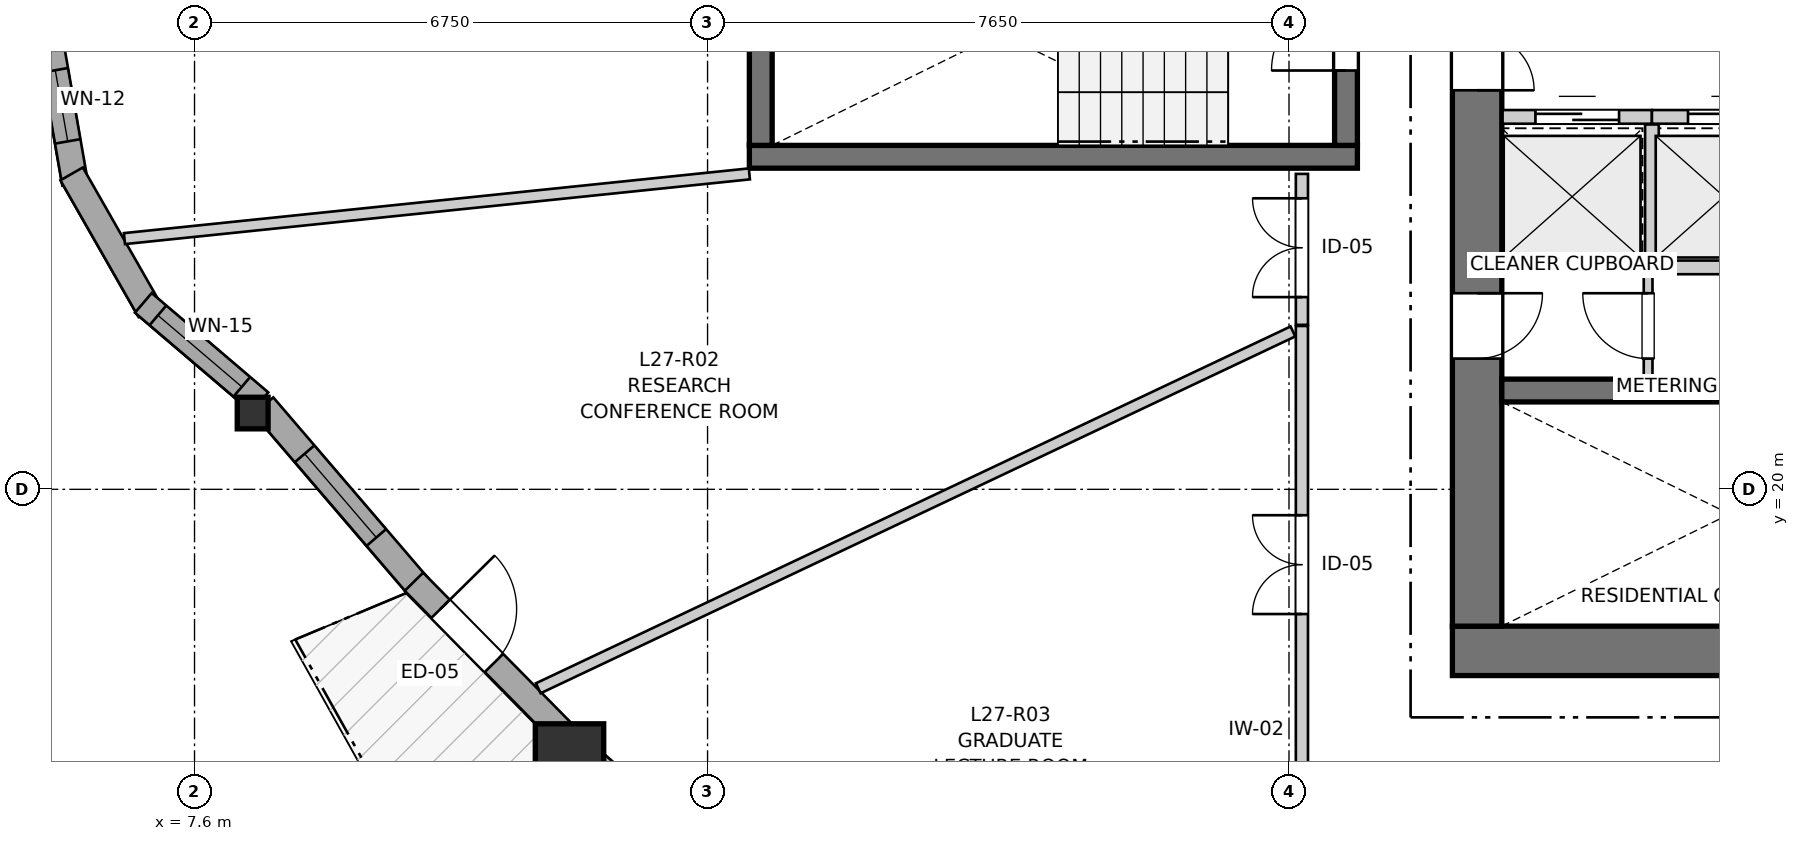
"""IFC4 building model, lengths in metres.
Left out: names, types, materials, properties, quantities, classifications, styles, units other than length and angle.
Written with IfcOpenShell. Run it as: python <this file> out.ifc"""

import sys

from ifc_helpers import new_model, si_unit, direction, frame, frame_2d, origin, origin_2d, place, context, subcontext, project, spatial, rectangle, i_section, extrude, source, transform, mapped, element, fill, save


model = new_model("IFC4")
c1 = context("Model", 3, precision=1e-05, world=origin(), true_north=direction((0.0, 1.0)))
c2 = subcontext(c1, "Body", "Model", "MODEL_VIEW")
j1 = project(units=[si_unit("LENGTHUNIT", "METRE"), si_unit("PLANEANGLEUNIT", "RADIAN")], contexts=[c1])
p1 = place(None, origin())
s1 = spatial("IfcSite", under=j1, at=p1, CompositionType="ELEMENT")
p2 = place(p1, origin())
s2 = spatial("IfcBuilding", under=s1, at=p2, CompositionType="ELEMENT")
p3 = place(p2, frame((0.0, 0.0, 92.8)))
s3 = spatial("IfcBuildingStorey", under=s2, at=p3, CompositionType="ELEMENT", Elevation=92.8)
p4 = place(p3, frame((24.15, 17.875, 0.0), z_axis=(0.0, 0.0, 1.0), x_axis=(1.0, 0.0, 0.0)))
e1 = element("IfcWall", 1, at=p4, inside=s3, PredefinedType="SHEAR", context=c2, shape_type="SweptSolid", body=[
    extrude(rectangle(XDim=12.4, YDim=0.65, at=frame_2d((6.2, 0.0))), origin(), (0.0, 0.0, 1.0), 2.95),
])
p5 = place(p3, frame((24.475, 33.8, 0.0), z_axis=(0.0, 0.0, 1.0), x_axis=(0.0, -1.0, 0.0)))
e2 = element("IfcWall", 2, at=p5, inside=s3, PredefinedType="SHEAR", context=c2, shape_type="SweptSolid", body=[
    extrude(rectangle(XDim=15.6, YDim=0.65, at=frame_2d((7.8, 0.0))), origin(), (0.0, 0.0, 1.0), 2.95),
])
p6 = place(p5, frame((7.05, 0.0, 0.0)))
e3 = element("IfcOpeningElement", 3, at=p6, cuts=e2, PredefinedType="OPENING", context=c2, shape_type="SweptSolid", body=[
    extrude(rectangle(XDim=1.5, YDim=2.15, at=frame_2d((0.75, 1.075))), frame((0.0, 0.335, 0.0), z_axis=(0.0, -1.0, 0.0), x_axis=(1.0, 0.0, 0.0)), (0.0, 0.0, 1.0), 0.67),
])
p7 = place(p5, frame((3.52, 0.0, 0.0)))
e4 = element("IfcOpeningElement", 4, at=p7, cuts=e2, PredefinedType="OPENING", context=c2, shape_type="SweptSolid", body=[
    extrude(rectangle(XDim=0.86, YDim=2.05, at=frame_2d((0.43, 1.025))), frame((0.0, 0.335, 0.0), z_axis=(0.0, -1.0, 0.0), x_axis=(1.0, 0.0, 0.0)), (0.0, 0.0, 1.0), 0.67),
])
p8 = place(p5, frame((11.22, 0.0, 0.0)))
e5 = element("IfcOpeningElement", 5, at=p8, cuts=e2, PredefinedType="OPENING", context=c2, shape_type="SweptSolid", body=[
    extrude(rectangle(XDim=0.86, YDim=2.05, at=frame_2d((0.43, 1.025))), frame((0.0, 0.335, 0.0), z_axis=(0.0, -1.0, 0.0), x_axis=(1.0, 0.0, 0.0)), (0.0, 0.0, 1.0), 0.67),
])
p9 = place(p3, frame((24.8, 21.3, 0.0), z_axis=(0.0, 0.0, 1.0), x_axis=(1.0, 0.0, 0.0)))
e6 = element("IfcWall", 6, at=p9, inside=s3, PredefinedType="SHEAR", context=c2, shape_type="SweptSolid", body=[
    extrude(rectangle(XDim=11.1, YDim=0.3, at=frame_2d((5.55, 0.0))), origin(), (0.0, 0.0, 1.0), 2.95),
])
p10 = place(p9, frame((6.22, 0.0, 0.0)))
e7 = element("IfcOpeningElement", 7, at=p10, cuts=e6, PredefinedType="OPENING", context=c2, shape_type="SweptSolid", body=[
    extrude(rectangle(XDim=0.98, YDim=2.15, at=frame_2d((0.49, 1.075))), frame((0.0, 0.16, 0.0), z_axis=(0.0, -1.0, 0.0), x_axis=(1.0, 0.0, 0.0)), (0.0, 0.0, 1.0), 0.32),
])
p11 = place(p9, frame((9.15, 0.0, 0.0)))
e8 = element("IfcOpeningElement", 8, at=p11, cuts=e6, PredefinedType="OPENING", context=c2, shape_type="SweptSolid", body=[
    extrude(rectangle(XDim=1.15, YDim=2.15, at=frame_2d((0.575, 1.075))), frame((0.0, 0.16, 0.0), z_axis=(0.0, -1.0, 0.0), x_axis=(1.0, 0.0, 0.0)), (0.0, 0.0, 1.0), 0.32),
])
p12 = place(p3, frame((14.9, 24.375, 0.0), z_axis=(0.0, 0.0, 1.0), x_axis=(1.0, 0.0, 0.0)))
e9 = element("IfcWall", 9, at=p12, inside=s3, PredefinedType="SHEAR", context=c2, shape_type="SweptSolid", body=[
    extrude(rectangle(XDim=8.0, YDim=0.3, at=frame_2d((4.0, 0.0))), origin(), (0.0, 0.0, 1.0), 2.95),
])
p13 = place(p3, frame((15.05, 27.475, 0.0), z_axis=(0.0, 0.0, 1.0), x_axis=(0.0, -1.0, 0.0)))
e10 = element("IfcWall", 10, at=p13, inside=s3, PredefinedType="SHEAR", context=c2, shape_type="SweptSolid", body=[
    extrude(rectangle(XDim=2.95, YDim=0.3, at=frame_2d((1.475, 0.0))), origin(), (0.0, 0.0, 1.0), 2.95),
])
p14 = place(p3, frame((22.75, 24.525, 0.0), z_axis=(0.0, 0.0, 1.0), x_axis=(0.0, 1.0, 0.0)))
e11 = element("IfcWall", 11, at=p14, inside=s3, PredefinedType="SHEAR", context=c2, shape_type="SweptSolid", body=[
    extrude(rectangle(XDim=2.95, YDim=0.3, at=frame_2d((1.475, 0.0))), origin(), (0.0, 0.0, 1.0), 2.95),
])
p15 = place(p14, frame((0.985, 0.0, 0.0)))
e12 = element("IfcOpeningElement", 12, at=p15, cuts=e11, PredefinedType="OPENING", context=c2, shape_type="SweptSolid", body=[
    extrude(rectangle(XDim=0.98, YDim=2.15, at=frame_2d((0.49, 1.075))), frame((0.0, 0.16, 0.0), z_axis=(0.0, -1.0, 0.0), x_axis=(1.0, 0.0, 0.0)), (0.0, 0.0, 1.0), 0.32),
])
m1 = source(origin(), c2, "Body", "SweptSolid", [
    extrude(i_section(OverallWidth=0.406, OverallDepth=0.416, WebThickness=0.027, FlangeThickness=0.044, FilletRadius=0.015, at=origin_2d()), origin(), (0.0, 0.0, 1.0), 2.95),
])
p16 = place(p3, frame((8.365, 21.004, 0.0), z_axis=(0.0, 0.0, 1.0), x_axis=(1.0, 0.0, 0.0)))
e13 = element("IfcColumn", 13, at=p16, inside=s3, PredefinedType="PILASTER", context=c2, shape_type="MappedRepresentation", body=[
    mapped(m1, transform((0.0, 0.0, 0.0), x_axis=(1.0, 0.0, 0.0), y_axis=(0.0, 1.0, 0.0), z_axis=(0.0, 0.0, 1.0), scale=1.0)),
])
m2 = source(origin(), c2, "Body", "SweptSolid", [
    extrude(rectangle(XDim=0.9, YDim=0.9, at=origin_2d()), origin(), (0.0, 0.0, 1.0), 2.95),
])
p17 = place(p3, frame((12.534, 16.465, 0.0), z_axis=(0.0, 0.0, 1.0), x_axis=(1.0, 0.0, 0.0)))
e14 = element("IfcColumn", 14, at=p17, inside=s3, PredefinedType="COLUMN", context=c2, shape_type="MappedRepresentation", body=[
    mapped(m2, transform((0.0, 0.0, 0.0), x_axis=(1.0, 0.0, 0.0), y_axis=(0.0, 1.0, 0.0), z_axis=(0.0, 0.0, 1.0), scale=1.0)),
])
p18 = place(p3, frame((5.671, 26.067, 0.0), z_axis=(0.0, 0.0, 1.0), x_axis=(0.172186061474, -0.985064444711, 0.0)))
e15 = element("IfcWall", 15, at=p18, inside=s3, PredefinedType="SOLIDWALL", context=c2, shape_type="SweptSolid", body=[
    extrude(rectangle(XDim=2.073, YDim=0.34, at=frame_2d((1.037, 0.0))), origin(), (0.0, 0.0, 1.0), 2.48),
])
p19 = place(p18, frame((0.562, 0.0, 0.82)))
e16 = element("IfcOpeningElement", 16, at=p19, cuts=e15, PredefinedType="OPENING", context=c2, shape_type="SweptSolid", body=[
    extrude(rectangle(XDim=0.95, YDim=1.35, at=frame_2d((0.475, 0.675))), frame((0.0, 0.18, 0.0), z_axis=(0.0, -1.0, 0.0), x_axis=(1.0, 0.0, 0.0)), (0.0, 0.0, 1.0), 0.36),
])
p20 = place(p3, frame((5.983, 24.15, 0.0), z_axis=(0.0, 0.0, 1.0), x_axis=(0.496037473582, -0.868301114132, 0.0)))
e17 = element("IfcWall", 17, at=p20, inside=s3, PredefinedType="SOLIDWALL", context=c2, shape_type="SweptSolid", body=[
    extrude(rectangle(XDim=2.073, YDim=0.34, at=frame_2d((1.037, 0.0))), origin(), (0.0, 0.0, 1.0), 2.48),
])
p21 = place(p3, frame((6.926, 22.453, 0.0), z_axis=(0.0, 0.0, 1.0), x_axis=(0.76114353683, -0.648583469063, 0.0)))
e18 = element("IfcWall", 18, at=p21, inside=s3, PredefinedType="SOLIDWALL", context=c2, shape_type="SweptSolid", body=[
    extrude(rectangle(XDim=2.015, YDim=0.34, at=frame_2d((1.007, 0.0))), origin(), (0.0, 0.0, 1.0), 2.48),
])
p22 = place(p21, frame((0.252, 0.0, 0.82)))
e19 = element("IfcOpeningElement", 19, at=p22, cuts=e18, PredefinedType="OPENING", context=c2, shape_type="SweptSolid", body=[
    extrude(rectangle(XDim=1.45, YDim=1.25, at=frame_2d((0.725, 0.625))), frame((0.0, 0.18, 0.0), z_axis=(0.0, -1.0, 0.0), x_axis=(1.0, 0.0, 0.0)), (0.0, 0.0, 1.0), 0.36),
])
p23 = place(p3, frame((8.507, 21.099, 0.0), z_axis=(0.0, 0.0, 1.0), x_axis=(0.650714375508, -0.759322593834, 0.0)))
e20 = element("IfcWall", 20, at=p23, inside=s3, PredefinedType="SOLIDWALL", context=c2, shape_type="SweptSolid", body=[
    extrude(rectangle(XDim=3.134, YDim=0.34, at=frame_2d((1.567, 0.0))), origin(), (0.0, 0.0, 1.0), 2.48),
])
p24 = place(p23, frame((0.832, 0.0, 0.82)))
e21 = element("IfcOpeningElement", 21, at=p24, cuts=e20, PredefinedType="OPENING", context=c2, shape_type="SweptSolid", body=[
    extrude(rectangle(XDim=1.45, YDim=1.25, at=frame_2d((0.725, 0.625))), frame((0.0, 0.18, 0.0), z_axis=(0.0, -1.0, 0.0), x_axis=(1.0, 0.0, 0.0)), (0.0, 0.0, 1.0), 0.36),
])
p25 = place(p3, frame((10.487, 18.784, 0.0), z_axis=(0.0, 0.0, 1.0), x_axis=(0.701920439278, -0.71225535935, 0.0)))
e22 = element("IfcWall", 22, at=p25, inside=s3, PredefinedType="SOLIDWALL", context=c2, shape_type="SweptSolid", body=[
    extrude(rectangle(XDim=2.858, YDim=0.34, at=frame_2d((1.429, 0.0))), origin(), (0.0, 0.0, 1.0), 2.48),
])
p26 = place(p25, frame((0.5, 0.0, 0.0)))
e23 = element("IfcOpeningElement", 23, at=p26, cuts=e22, PredefinedType="OPENING", context=c2, shape_type="SweptSolid", body=[
    extrude(rectangle(XDim=1.0, YDim=2.1, at=frame_2d((0.5, 1.05))), frame((0.0, 0.18, 0.0), z_axis=(0.0, -1.0, 0.0), x_axis=(1.0, 0.0, 0.0)), (0.0, 0.0, 1.0), 0.36),
])
p27 = place(p3, frame((12.819, 16.441, 0.0), z_axis=(0.0, 0.0, 1.0), x_axis=(0.751471759174, -0.659765257621, 0.0)))
e24 = element("IfcWall", 24, at=p27, inside=s3, PredefinedType="SOLIDWALL", context=c2, shape_type="SweptSolid", body=[
    extrude(rectangle(XDim=2.809, YDim=0.34, at=frame_2d((1.404, 0.0))), origin(), (0.0, 0.0, 1.0), 2.48),
])
p28 = place(p27, frame((0.499, 0.0, 0.82)))
e25 = element("IfcOpeningElement", 25, at=p28, cuts=e24, PredefinedType="OPENING", context=c2, shape_type="SweptSolid", body=[
    extrude(rectangle(XDim=1.8, YDim=1.45, at=frame_2d((0.9, 0.725))), frame((0.0, 0.18, 0.0), z_axis=(0.0, -1.0, 0.0), x_axis=(1.0, 0.0, 0.0)), (0.0, 0.0, 1.0), 0.36),
])
p29 = place(p3, frame((24.81, 22.92, 0.0), z_axis=(0.0, 0.0, 1.0), x_axis=(1.0, 0.0, 0.0)))
e26 = element("IfcWall", 26, at=p29, inside=s3, PredefinedType="PARTITIONING", context=c2, shape_type="SweptSolid", body=[
    extrude(rectangle(XDim=5.84, YDim=0.18, at=frame_2d((2.92, 0.0))), origin(), (0.0, 0.0, 1.0), 2.95),
])
p30 = place(p3, frame((24.81, 24.9, 0.0), z_axis=(0.0, 0.0, 1.0), x_axis=(1.0, 0.0, 0.0)))
e27 = element("IfcWall", 27, at=p30, inside=s3, PredefinedType="PARTITIONING", context=c2, shape_type="SweptSolid", body=[
    extrude(rectangle(XDim=1.965, YDim=0.18, at=frame_2d((0.982, 0.0))), origin(), (0.0, 0.0, 1.0), 2.95),
])
p31 = place(p30, frame((0.433, 0.0, 0.0)))
e28 = element("IfcOpeningElement", 28, at=p31, cuts=e27, PredefinedType="OPENING", context=c2, shape_type="SweptSolid", body=[
    extrude(rectangle(XDim=1.1, YDim=2.15, at=frame_2d((0.55, 1.075))), frame((0.0, 0.1, 0.0), z_axis=(0.0, -1.0, 0.0), x_axis=(1.0, 0.0, 0.0)), (0.0, 0.0, 1.0), 0.2),
])
p32 = place(p3, frame((26.775, 24.9, 0.0), z_axis=(0.0, 0.0, 1.0), x_axis=(1.0, 0.0, 0.0)))
e29 = element("IfcWall", 29, at=p32, inside=s3, PredefinedType="PARTITIONING", context=c2, shape_type="SweptSolid", body=[
    extrude(rectangle(XDim=2.05, YDim=0.18, at=frame_2d((1.025, 0.0))), origin(), (0.0, 0.0, 1.0), 2.95),
])
p33 = place(p32, frame((0.475, 0.0, 0.0)))
e30 = element("IfcOpeningElement", 30, at=p33, cuts=e29, PredefinedType="OPENING", context=c2, shape_type="SweptSolid", body=[
    extrude(rectangle(XDim=1.1, YDim=2.15, at=frame_2d((0.55, 1.075))), frame((0.0, 0.1, 0.0), z_axis=(0.0, -1.0, 0.0), x_axis=(1.0, 0.0, 0.0)), (0.0, 0.0, 1.0), 0.2),
])
p34 = place(p3, frame((26.775, 23.02, 0.0), z_axis=(0.0, 0.0, 1.0), x_axis=(0.0, 1.0, 0.0)))
e31 = element("IfcWall", 31, at=p34, inside=s3, PredefinedType="PARTITIONING", context=c2, shape_type="SweptSolid", body=[
    extrude(rectangle(XDim=1.78, YDim=0.18, at=frame_2d((0.89, 0.0))), origin(), (0.0, 0.0, 1.0), 2.95),
])
p35 = place(p3, frame((26.725, 21.46, 0.0), z_axis=(0.0, 0.0, 1.0), x_axis=(0.0, 1.0, 0.0)))
e32 = element("IfcWall", 32, at=p35, inside=s3, PredefinedType="PARTITIONING", context=c2, shape_type="SweptSolid", body=[
    extrude(rectangle(XDim=1.38, YDim=0.115, at=frame_2d((0.69, 0.0))), origin(), (0.0, 0.0, 1.0), 2.95),
])
p36 = place(p35, frame((0.26, 0.0, 0.0)))
e33 = element("IfcOpeningElement", 33, at=p36, cuts=e32, PredefinedType="OPENING", context=c2, shape_type="SweptSolid", body=[
    extrude(rectangle(XDim=0.86, YDim=2.05, at=frame_2d((0.43, 1.025))), frame((0.0, 0.067, 0.0), z_axis=(0.0, -1.0, 0.0), x_axis=(1.0, 0.0, 0.0)), (0.0, 0.0, 1.0), 0.135),
])
p37 = place(p3, frame((22.17, 15.862, 0.0), z_axis=(0.0, 0.0, 1.0), x_axis=(0.0, 1.0, 0.0)))
e34 = element("IfcWall", 34, at=p37, inside=s3, PredefinedType="PARTITIONING", context=c2, shape_type="SweptSolid", body=[
    extrude(rectangle(XDim=6.287, YDim=0.16, at=frame_2d((3.144, 0.0))), origin(), (0.0, 0.0, 1.0), 2.95),
])
p38 = place(p37, frame((2.498, 0.0, 0.0)))
e35 = element("IfcOpeningElement", 35, at=p38, cuts=e34, PredefinedType="OPENING", context=c2, shape_type="SweptSolid", body=[
    extrude(rectangle(XDim=1.3, YDim=2.1, at=frame_2d((0.65, 1.05))), frame((0.0, 0.09, 0.0), z_axis=(0.0, -1.0, 0.0), x_axis=(1.0, 0.0, 0.0)), (0.0, 0.0, 1.0), 0.18),
])
p39 = place(p3, frame((22.17, 22.164, 0.0), z_axis=(0.0, 0.0, 1.0), x_axis=(0.0, 1.0, 0.0)))
e36 = element("IfcWall", 36, at=p39, inside=s3, PredefinedType="PARTITIONING", context=c2, shape_type="SweptSolid", body=[
    extrude(rectangle(XDim=1.986, YDim=0.16, at=frame_2d((0.993, 0.0))), origin(), (0.0, 0.0, 1.0), 2.95),
])
p40 = place(p39, frame((0.365, 0.0, 0.0)))
e37 = element("IfcOpeningElement", 37, at=p40, cuts=e36, PredefinedType="OPENING", context=c2, shape_type="SweptSolid", body=[
    extrude(rectangle(XDim=1.3, YDim=2.1, at=frame_2d((0.65, 1.05))), frame((0.0, 0.09, 0.0), z_axis=(0.0, -1.0, 0.0), x_axis=(1.0, 0.0, 0.0)), (0.0, 0.0, 1.0), 0.18),
])
p41 = place(p3, frame((12.123, 17.383, 0.0), z_axis=(0.0, 0.0, 1.0), x_axis=(0.904049465168, 0.427427847162, 0.0)))
e38 = element("IfcWall", 38, at=p41, inside=s3, PredefinedType="PARTITIONING", context=c2, shape_type="SweptSolid", body=[
    extrude(rectangle(XDim=10.983, YDim=0.145, at=frame_2d((5.491, 0.0))), origin(), (0.0, 0.0, 1.0), 2.95),
])
p42 = place(p3, frame((6.678, 23.299, 0.0), z_axis=(0.0, 0.0, 1.0), x_axis=(0.994682199009, 0.102991858774, 0.0)))
e39 = element("IfcWall", 39, at=p42, inside=s3, PredefinedType="PARTITIONING", context=c2, shape_type="SweptSolid", body=[
    extrude(rectangle(XDim=8.266, YDim=0.145, at=frame_2d((4.133, 0.0))), origin(), (0.0, 0.0, 1.0), 2.95),
])
m3 = source(origin(), c2, "Body", "SweptSolid", [
    extrude(rectangle(XDim=0.95, YDim=1.35, at=frame_2d((0.475, 0.675))), frame((0.0, 0.03, 0.0), z_axis=(0.0, -1.0, 0.0), x_axis=(1.0, 0.0, 0.0)), (0.0, 0.0, 1.0), 0.06),
])
p43 = place(p19, origin())
e40 = element("IfcWindow", 40, at=p43, inside=s3, PartitioningType="SINGLE_PANEL", PredefinedType="WINDOW", context=c2, shape_type="MappedRepresentation", body=[
    mapped(m3, transform((0.0, 0.0, 0.0), x_axis=(1.0, 0.0, 0.0), y_axis=(0.0, 1.0, 0.0), z_axis=(0.0, 0.0, 1.0), scale=1.0)),
])
fill(e16, e40)
m4 = source(origin(), c2, "Body", "SweptSolid", [
    extrude(rectangle(XDim=1.45, YDim=1.25, at=frame_2d((0.725, 0.625))), frame((0.0, 0.03, 0.0), z_axis=(0.0, -1.0, 0.0), x_axis=(1.0, 0.0, 0.0)), (0.0, 0.0, 1.0), 0.06),
])
p44 = place(p22, origin())
e41 = element("IfcWindow", 41, at=p44, inside=s3, PartitioningType="SINGLE_PANEL", PredefinedType="WINDOW", context=c2, shape_type="MappedRepresentation", body=[
    mapped(m4, transform((0.0, 0.0, 0.0), x_axis=(1.0, 0.0, 0.0), y_axis=(0.0, 1.0, 0.0), z_axis=(0.0, 0.0, 1.0), scale=1.0)),
])
fill(e19, e41)
p45 = place(p24, origin())
e42 = element("IfcWindow", 42, at=p45, inside=s3, PartitioningType="SINGLE_PANEL", PredefinedType="WINDOW", context=c2, shape_type="MappedRepresentation", body=[
    mapped(m4, transform((0.0, 0.0, 0.0), x_axis=(1.0, 0.0, 0.0), y_axis=(0.0, 1.0, 0.0), z_axis=(0.0, 0.0, 1.0), scale=1.0)),
])
fill(e21, e42)
m5 = source(origin(), c2, "Body", "SweptSolid", [
    extrude(rectangle(XDim=1.0, YDim=2.1, at=frame_2d((0.5, 1.05))), frame((0.0, 0.025, 0.0), z_axis=(0.0, -1.0, 0.0), x_axis=(1.0, 0.0, 0.0)), (0.0, 0.0, 1.0), 0.05),
])
p46 = place(p26, origin())
e43 = element("IfcDoor", 43, at=p46, inside=s3, OperationType="SINGLE_SWING_LEFT", PredefinedType="DOOR", context=c2, shape_type="MappedRepresentation", body=[
    mapped(m5, transform((0.0, 0.0, 0.0), x_axis=(1.0, 0.0, 0.0), y_axis=(0.0, 1.0, 0.0), z_axis=(0.0, 0.0, 1.0), scale=1.0)),
])
fill(e23, e43)
m6 = source(origin(), c2, "Body", "SweptSolid", [
    extrude(rectangle(XDim=0.98, YDim=2.15, at=frame_2d((0.49, 1.075))), frame((0.0, 0.025, 0.0), z_axis=(0.0, -1.0, 0.0), x_axis=(1.0, 0.0, 0.0)), (0.0, 0.0, 1.0), 0.05),
])
p47 = place(p15, origin())
e44 = element("IfcDoor", 44, at=p47, inside=s3, OperationType="SINGLE_SWING_LEFT", PredefinedType="DOOR", context=c2, shape_type="MappedRepresentation", body=[
    mapped(m6, transform((0.0, 0.0, 0.0), x_axis=(1.0, 0.0, 0.0), y_axis=(0.0, 1.0, 0.0), z_axis=(0.0, 0.0, 1.0), scale=1.0)),
])
fill(e12, e44)
m7 = source(origin(), c2, "Body", "SweptSolid", [
    extrude(rectangle(XDim=1.5, YDim=2.15, at=frame_2d((0.75, 1.075))), frame((0.0, 0.025, 0.0), z_axis=(0.0, -1.0, 0.0), x_axis=(1.0, 0.0, 0.0)), (0.0, 0.0, 1.0), 0.05),
])
p48 = place(p6, origin())
e45 = element("IfcDoor", 45, at=p48, inside=s3, OperationType="DOUBLE_DOOR_SINGLE_SWING", PredefinedType="DOOR", context=c2, shape_type="MappedRepresentation", body=[
    mapped(m7, transform((0.0, 0.0, 0.0), x_axis=(1.0, 0.0, 0.0), y_axis=(0.0, 1.0, 0.0), z_axis=(0.0, 0.0, 1.0), scale=1.0)),
])
fill(e3, e45)
m8 = source(origin(), c2, "Body", "SweptSolid", [
    extrude(rectangle(XDim=0.86, YDim=2.05, at=frame_2d((0.43, 1.025))), frame((0.0, 0.025, 0.0), z_axis=(0.0, -1.0, 0.0), x_axis=(1.0, 0.0, 0.0)), (0.0, 0.0, 1.0), 0.05),
])
p49 = place(p8, origin())
e46 = element("IfcDoor", 46, at=p49, inside=s3, OperationType="SINGLE_SWING_LEFT", PredefinedType="DOOR", context=c2, shape_type="MappedRepresentation", body=[
    mapped(m8, transform((0.0, 0.0, 0.0), x_axis=(1.0, 0.0, 0.0), y_axis=(0.0, 1.0, 0.0), z_axis=(0.0, 0.0, 1.0), scale=1.0)),
])
fill(e5, e46)
m9 = source(origin(), c2, "Body", "SweptSolid", [
    extrude(rectangle(XDim=1.1, YDim=2.15, at=frame_2d((0.55, 1.075))), frame((0.0, 0.025, 0.0), z_axis=(0.0, -1.0, 0.0), x_axis=(1.0, 0.0, 0.0)), (0.0, 0.0, 1.0), 0.05),
])
p50 = place(p31, origin())
e47 = element("IfcDoor", 47, at=p50, inside=s3, OperationType="DOUBLE_DOOR_SLIDING", PredefinedType="DOOR", context=c2, shape_type="MappedRepresentation", body=[
    mapped(m9, transform((0.0, 0.0, 0.0), x_axis=(1.0, 0.0, 0.0), y_axis=(0.0, 1.0, 0.0), z_axis=(0.0, 0.0, 1.0), scale=1.0)),
])
fill(e28, e47)
p51 = place(p33, origin())
e48 = element("IfcDoor", 48, at=p51, inside=s3, OperationType="DOUBLE_DOOR_SLIDING", PredefinedType="DOOR", context=c2, shape_type="MappedRepresentation", body=[
    mapped(m9, transform((0.0, 0.0, 0.0), x_axis=(1.0, 0.0, 0.0), y_axis=(0.0, 1.0, 0.0), z_axis=(0.0, 0.0, 1.0), scale=1.0)),
])
fill(e30, e48)
p52 = place(p36, origin())
e49 = element("IfcDoor", 49, at=p52, inside=s3, OperationType="SINGLE_SWING_RIGHT", PredefinedType="DOOR", context=c2, shape_type="MappedRepresentation", body=[
    mapped(m8, transform((0.0, 0.0, 0.0), x_axis=(1.0, 0.0, 0.0), y_axis=(0.0, 1.0, 0.0), z_axis=(0.0, 0.0, 1.0), scale=1.0)),
])
fill(e33, e49)
m10 = source(origin(), c2, "Body", "SweptSolid", [
    extrude(rectangle(XDim=1.3, YDim=2.1, at=frame_2d((0.65, 1.05))), frame((0.0, 0.025, 0.0), z_axis=(0.0, -1.0, 0.0), x_axis=(1.0, 0.0, 0.0)), (0.0, 0.0, 1.0), 0.05),
])
p53 = place(p38, origin())
e50 = element("IfcDoor", 50, at=p53, inside=s3, OperationType="DOUBLE_DOOR_SINGLE_SWING", PredefinedType="DOOR", context=c2, shape_type="MappedRepresentation", body=[
    mapped(m10, transform((0.0, 0.0, 0.0), x_axis=(1.0, 0.0, 0.0), y_axis=(0.0, 1.0, 0.0), z_axis=(0.0, 0.0, 1.0), scale=1.0)),
])
fill(e35, e50)
p54 = place(p40, origin())
e51 = element("IfcDoor", 51, at=p54, inside=s3, OperationType="DOUBLE_DOOR_SINGLE_SWING", PredefinedType="DOOR", context=c2, shape_type="MappedRepresentation", body=[
    mapped(m10, transform((0.0, 0.0, 0.0), x_axis=(1.0, 0.0, 0.0), y_axis=(0.0, 1.0, 0.0), z_axis=(0.0, 0.0, 1.0), scale=1.0)),
])
fill(e37, e51)
save(model, sys.argv[1])
